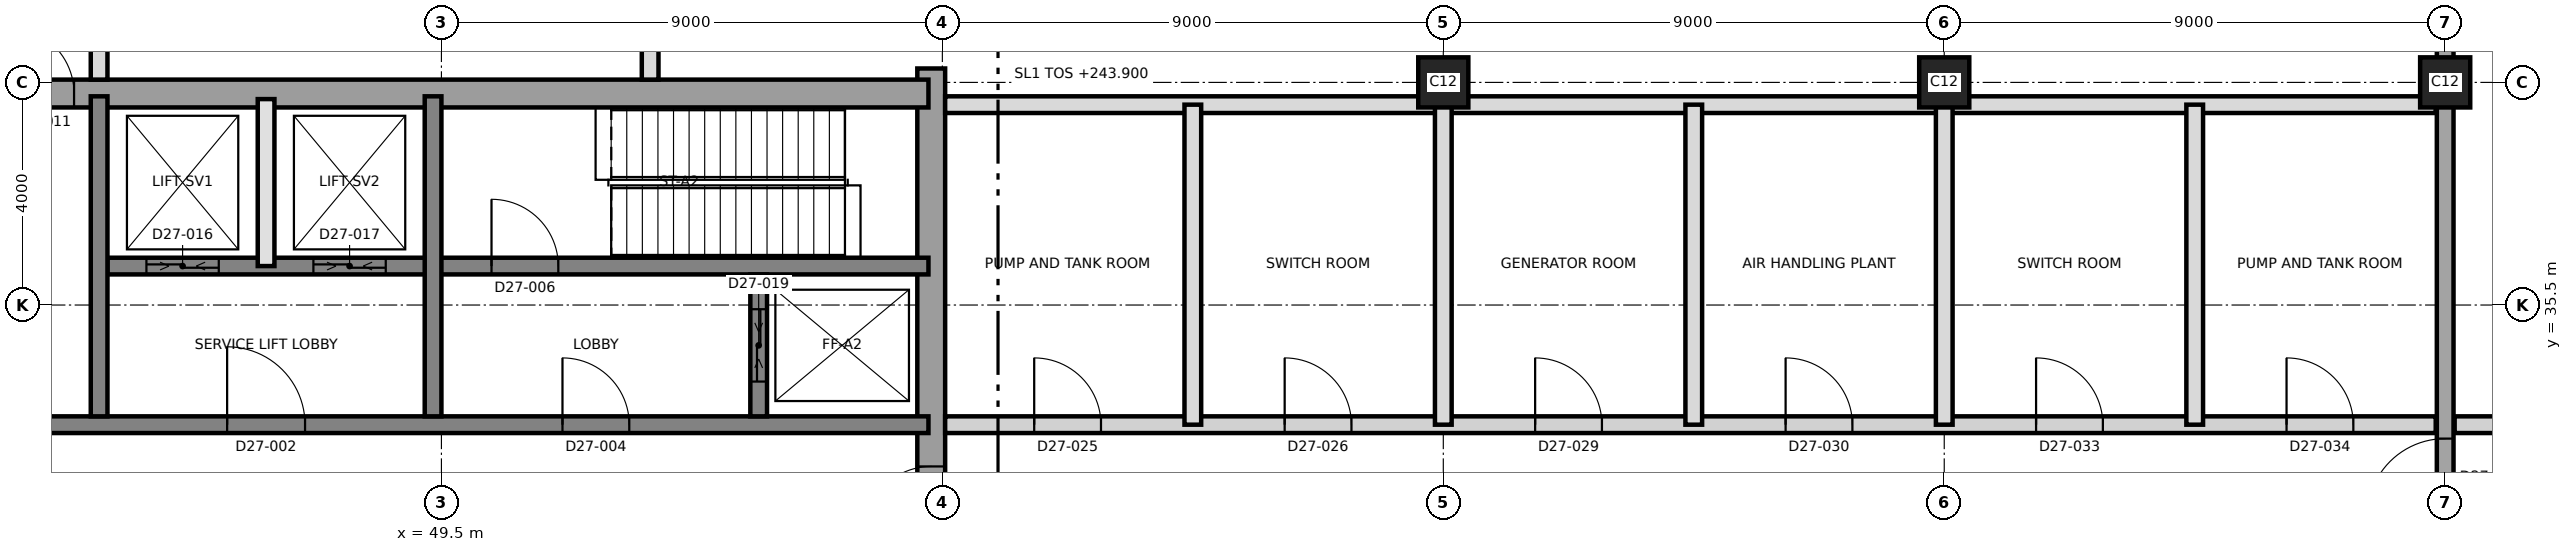
"""IFC4 building model, lengths in metres.
Left out: names, types, materials, properties, quantities, classifications, styles, units other than length and angle.
Written with IfcOpenShell. Run it as: python <this file> out.ifc"""

import sys

from ifc_helpers import new_model, si_unit, direction, frame, frame_2d, origin, origin_2d, place, context, subcontext, project, spatial, rectangle, extrude, element, fill, save


model = new_model("IFC4")
c1 = context("Model", 3, precision=1e-05, world=origin(), true_north=direction((0.0, 1.0)))
c2 = subcontext(c1, "Body", "Model", "MODEL_VIEW")
j1 = project(units=[si_unit("LENGTHUNIT", "METRE"), si_unit("PLANEANGLEUNIT", "RADIAN")], contexts=[c1])
p1 = place(None, origin())
s1 = spatial("IfcSite", under=j1, at=p1, CompositionType="ELEMENT")
p2 = place(p1, origin())
s2 = spatial("IfcBuilding", under=s1, at=p2, CompositionType="ELEMENT")
p3 = place(p2, frame((0.0, 0.0, 243.9)))
s3 = spatial("IfcBuildingStorey", under=s2, at=p3, CompositionType="ELEMENT", Elevation=243.9)
p4 = place(p3, frame((58.3, 21.25, 0.0), z_axis=(0.0, 0.0, 1.0), x_axis=(0.0, 1.0, 0.0)))
e1 = element("IfcWall", 1, at=p4, inside=s3, PredefinedType="SHEAR", context=c2, shape_type="SweptSolid", body=[
    extrude(rectangle(XDim=18.5, YDim=0.5, at=frame_2d((9.25, 0.0))), origin(), (0.0, 0.0, 1.0), 5.5),
])
p5 = place(p4, frame((10.15, 0.0, 0.0)))
e2 = element("IfcOpeningElement", 2, at=p5, cuts=e1, PredefinedType="OPENING", context=c2, shape_type="SweptSolid", body=[
    extrude(rectangle(XDim=1.2, YDim=2.1, at=frame_2d((0.6, 1.05))), frame((0.0, 0.26, 0.0), z_axis=(0.0, -1.0, 0.0), x_axis=(1.0, 0.0, 0.0)), (0.0, 0.0, 1.0), 0.52),
])
p6 = place(p3, frame((31.25, 39.3, 0.0), z_axis=(0.0, 0.0, 1.0), x_axis=(1.0, 0.0, 0.0)))
e3 = element("IfcWall", 3, at=p6, inside=s3, PredefinedType="SHEAR", context=c2, shape_type="SweptSolid", body=[
    extrude(rectangle(XDim=27.0, YDim=0.5, at=frame_2d((13.5, 0.0))), origin(), (0.0, 0.0, 1.0), 5.5),
])
p7 = place(p6, frame((10.45, 0.0, 0.0)))
e4 = element("IfcOpeningElement", 4, at=p7, cuts=e3, PredefinedType="OPENING", context=c2, shape_type="SweptSolid", body=[
    extrude(rectangle(XDim=1.2, YDim=2.1, at=frame_2d((0.6, 1.05))), frame((0.0, 0.26, 0.0), z_axis=(0.0, -1.0, 0.0), x_axis=(1.0, 0.0, 0.0)), (0.0, 0.0, 1.0), 0.52),
])
p8 = place(p3, frame((31.75, 33.35, 0.0), z_axis=(0.0, 0.0, 1.0), x_axis=(1.0, 0.0, 0.0)))
e5 = element("IfcWall", 5, at=p8, inside=s3, PredefinedType="SHEAR", context=c2, shape_type="SweptSolid", body=[
    extrude(rectangle(XDim=26.5, YDim=0.3, at=frame_2d((13.25, 0.0))), origin(), (0.0, 0.0, 1.0), 5.5),
])
p9 = place(p8, frame((13.9, 0.0, 0.0)))
e6 = element("IfcOpeningElement", 6, at=p9, cuts=e5, PredefinedType="OPENING", context=c2, shape_type="SweptSolid", body=[
    extrude(rectangle(XDim=1.4, YDim=2.1, at=frame_2d((0.7, 1.05))), frame((0.0, 0.16, 0.0), z_axis=(0.0, -1.0, 0.0), x_axis=(1.0, 0.0, 0.0)), (0.0, 0.0, 1.0), 0.32),
])
p10 = place(p8, frame((5.375, 0.0, 0.0)))
e7 = element("IfcOpeningElement", 7, at=p10, cuts=e5, PredefinedType="OPENING", context=c2, shape_type="SweptSolid", body=[
    extrude(rectangle(XDim=1.2, YDim=2.1, at=frame_2d((0.6, 1.05))), frame((0.0, 0.16, 0.0), z_axis=(0.0, -1.0, 0.0), x_axis=(1.0, 0.0, 0.0)), (0.0, 0.0, 1.0), 0.32),
])
p11 = place(p8, frame((19.925, 0.0, 0.0)))
e8 = element("IfcOpeningElement", 8, at=p11, cuts=e5, PredefinedType="OPENING", context=c2, shape_type="SweptSolid", body=[
    extrude(rectangle(XDim=1.2, YDim=2.1, at=frame_2d((0.6, 1.05))), frame((0.0, 0.16, 0.0), z_axis=(0.0, -1.0, 0.0), x_axis=(1.0, 0.0, 0.0)), (0.0, 0.0, 1.0), 0.32),
])
p12 = place(p3, frame((43.5, 36.2, 0.0), z_axis=(0.0, 0.0, 1.0), x_axis=(1.0, 0.0, 0.0)))
e9 = element("IfcWall", 9, at=p12, inside=s3, PredefinedType="SHEAR", context=c2, shape_type="SweptSolid", body=[
    extrude(rectangle(XDim=14.75, YDim=0.3, at=frame_2d((7.375, 0.0))), origin(), (0.0, 0.0, 1.0), 5.5),
])
p13 = place(p12, frame((6.9, 0.0, 0.0)))
e10 = element("IfcOpeningElement", 10, at=p13, cuts=e9, PredefinedType="OPENING", context=c2, shape_type="SweptSolid", body=[
    extrude(rectangle(XDim=1.2, YDim=2.1, at=frame_2d((0.6, 1.05))), frame((0.0, 0.16, 0.0), z_axis=(0.0, -1.0, 0.0), x_axis=(1.0, 0.0, 0.0)), (0.0, 0.0, 1.0), 0.32),
])
p14 = place(p12, frame((0.7, 0.0, 0.0)))
e11 = element("IfcOpeningElement", 11, at=p14, cuts=e9, PredefinedType="OPENING", context=c2, shape_type="SweptSolid", body=[
    extrude(rectangle(XDim=1.3, YDim=2.4, at=frame_2d((0.65, 1.2))), frame((0.0, 0.16, 0.0), z_axis=(0.0, -1.0, 0.0), x_axis=(1.0, 0.0, 0.0)), (0.0, 0.0, 1.0), 0.32),
])
p15 = place(p12, frame((3.7, 0.0, 0.0)))
e12 = element("IfcOpeningElement", 12, at=p15, cuts=e9, PredefinedType="OPENING", context=c2, shape_type="SweptSolid", body=[
    extrude(rectangle(XDim=1.3, YDim=2.4, at=frame_2d((0.65, 1.2))), frame((0.0, 0.16, 0.0), z_axis=(0.0, -1.0, 0.0), x_axis=(1.0, 0.0, 0.0)), (0.0, 0.0, 1.0), 0.32),
])
for number, where, z_axis, x_axis in (
    (13, (43.35, 33.5, 0.0), (0.0, 0.0, 1.0), (0.0, 1.0, 0.0)),
    (14, (49.35, 33.5, 0.0), (0.0, 0.0, 1.0), (0.0, 1.0, 0.0)),
):
    element("IfcWall", number, at=place(p3, frame(where, z_axis=z_axis, x_axis=x_axis)), inside=s3, PredefinedType="SHEAR", context=c2, shape_type="SweptSolid", body=[
        extrude(rectangle(XDim=5.75, YDim=0.3, at=frame_2d((2.875, 0.0))), origin(), (0.0, 0.0, 1.0), 5.5),
    ])
p16 = place(p3, frame((55.2, 33.5, 0.0), z_axis=(0.0, 0.0, 1.0), x_axis=(0.0, 1.0, 0.0)))
e15 = element("IfcWall", 15, at=p16, inside=s3, PredefinedType="SHEAR", context=c2, shape_type="SweptSolid", body=[
    extrude(rectangle(XDim=2.55, YDim=0.3, at=frame_2d((1.275, 0.0))), origin(), (0.0, 0.0, 1.0), 5.5),
])
p17 = place(p16, frame((0.625, 0.0, 0.0)))
e16 = element("IfcOpeningElement", 16, at=p17, cuts=e15, PredefinedType="OPENING", context=c2, shape_type="SweptSolid", body=[
    extrude(rectangle(XDim=1.3, YDim=2.4, at=frame_2d((0.65, 1.2))), frame((0.0, 0.16, 0.0), z_axis=(0.0, -1.0, 0.0), x_axis=(1.0, 0.0, 0.0)), (0.0, 0.0, 1.0), 0.32),
])
for number, where, z_axis, x_axis in (
    (17, (67.5, 39.5, 0.0), (0.0, 0.0, 1.0), (1.0, 0.0, 0.0)),
    (18, (76.5, 39.5, 0.0), (0.0, 0.0, 1.0), (1.0, 0.0, 0.0)),
    (19, (85.5, 39.5, 0.0), (0.0, 0.0, 1.0), (1.0, 0.0, 0.0)),
):
    element("IfcColumn", number, at=place(p3, frame(where, z_axis=z_axis, x_axis=x_axis)), inside=s3, PredefinedType="COLUMN", context=c2, shape_type="SweptSolid", body=[
        extrude(rectangle(XDim=0.9, YDim=0.9, at=origin_2d()), origin(), (0.0, 0.0, 1.0), 5.5),
    ])
p18 = place(p3, frame((85.5, 20.35, 0.0), z_axis=(0.0, 0.0, 1.0), x_axis=(0.0, 1.0, 0.0)))
e20 = element("IfcWall", 20, at=p18, inside=s3, PredefinedType="SHEAR", context=c2, shape_type="SweptSolid", body=[
    extrude(rectangle(XDim=20.3, YDim=0.3, at=frame_2d((10.15, 0.0))), origin(), (0.0, 0.0, 1.0), 5.5),
])
p19 = place(p18, frame((11.35, 0.0, 0.0)))
e21 = element("IfcOpeningElement", 21, at=p19, cuts=e20, PredefinedType="OPENING", context=c2, shape_type="SweptSolid", body=[
    extrude(rectangle(XDim=1.4, YDim=2.1, at=frame_2d((0.7, 1.05))), frame((0.0, 0.16, 0.0), z_axis=(0.0, -1.0, 0.0), x_axis=(1.0, 0.0, 0.0)), (0.0, 0.0, 1.0), 0.32),
])
p20 = place(p3, frame((46.35, 36.2, 0.0), z_axis=(0.0, 0.0, 1.0), x_axis=(0.0, 1.0, 0.0)))
e22 = element("IfcWall", 22, at=p20, inside=s3, PredefinedType="SOLIDWALL", context=c2, shape_type="SweptSolid", body=[
    extrude(rectangle(XDim=3.0, YDim=0.3, at=frame_2d((1.5, 0.0))), origin(), (0.0, 0.0, 1.0), 5.2),
])
p21 = place(p3, frame((58.55, 33.35, 0.0), z_axis=(0.0, 0.0, 1.0), x_axis=(1.0, 0.0, 0.0)))
e23 = element("IfcWall", 23, at=p21, inside=s3, PredefinedType="PARTITIONING", context=c2, shape_type="SweptSolid", body=[
    extrude(rectangle(XDim=26.78, YDim=0.3, at=frame_2d((13.39, 0.0))), origin(), (0.0, 0.0, 1.0), 5.2),
])
p22 = place(p21, frame((1.6, 0.0, 0.0)))
e24 = element("IfcOpeningElement", 24, at=p22, cuts=e23, PredefinedType="OPENING", context=c2, shape_type="SweptSolid", body=[
    extrude(rectangle(XDim=1.2, YDim=2.1, at=frame_2d((0.6, 1.05))), frame((0.0, 0.16, 0.0), z_axis=(0.0, -1.0, 0.0), x_axis=(1.0, 0.0, 0.0)), (0.0, 0.0, 1.0), 0.32),
])
p23 = place(p21, frame((6.1, 0.0, 0.0)))
e25 = element("IfcOpeningElement", 25, at=p23, cuts=e23, PredefinedType="OPENING", context=c2, shape_type="SweptSolid", body=[
    extrude(rectangle(XDim=1.2, YDim=2.1, at=frame_2d((0.6, 1.05))), frame((0.0, 0.16, 0.0), z_axis=(0.0, -1.0, 0.0), x_axis=(1.0, 0.0, 0.0)), (0.0, 0.0, 1.0), 0.32),
])
p24 = place(p21, frame((10.6, 0.0, 0.0)))
e26 = element("IfcOpeningElement", 26, at=p24, cuts=e23, PredefinedType="OPENING", context=c2, shape_type="SweptSolid", body=[
    extrude(rectangle(XDim=1.2, YDim=2.1, at=frame_2d((0.6, 1.05))), frame((0.0, 0.16, 0.0), z_axis=(0.0, -1.0, 0.0), x_axis=(1.0, 0.0, 0.0)), (0.0, 0.0, 1.0), 0.32),
])
p25 = place(p21, frame((15.1, 0.0, 0.0)))
e27 = element("IfcOpeningElement", 27, at=p25, cuts=e23, PredefinedType="OPENING", context=c2, shape_type="SweptSolid", body=[
    extrude(rectangle(XDim=1.2, YDim=2.1, at=frame_2d((0.6, 1.05))), frame((0.0, 0.16, 0.0), z_axis=(0.0, -1.0, 0.0), x_axis=(1.0, 0.0, 0.0)), (0.0, 0.0, 1.0), 0.32),
])
p26 = place(p21, frame((19.6, 0.0, 0.0)))
e28 = element("IfcOpeningElement", 28, at=p26, cuts=e23, PredefinedType="OPENING", context=c2, shape_type="SweptSolid", body=[
    extrude(rectangle(XDim=1.2, YDim=2.1, at=frame_2d((0.6, 1.05))), frame((0.0, 0.16, 0.0), z_axis=(0.0, -1.0, 0.0), x_axis=(1.0, 0.0, 0.0)), (0.0, 0.0, 1.0), 0.32),
])
p27 = place(p21, frame((24.1, 0.0, 0.0)))
e29 = element("IfcOpeningElement", 29, at=p27, cuts=e23, PredefinedType="OPENING", context=c2, shape_type="SweptSolid", body=[
    extrude(rectangle(XDim=1.2, YDim=2.1, at=frame_2d((0.6, 1.05))), frame((0.0, 0.16, 0.0), z_axis=(0.0, -1.0, 0.0), x_axis=(1.0, 0.0, 0.0)), (0.0, 0.0, 1.0), 0.32),
])
p28 = place(p3, frame((85.67, 33.35, 0.0), z_axis=(0.0, 0.0, 1.0), x_axis=(1.0, 0.0, 0.0)))
e30 = element("IfcWall", 30, at=p28, inside=s3, PredefinedType="PARTITIONING", context=c2, shape_type="SweptSolid", body=[
    extrude(rectangle(XDim=9.705, YDim=0.3, at=frame_2d((4.853, 0.0))), origin(), (0.0, 0.0, 1.0), 5.2),
])
p29 = place(p28, frame((2.73, 0.0, 0.0)))
e31 = element("IfcOpeningElement", 31, at=p29, cuts=e30, PredefinedType="OPENING", context=c2, shape_type="SweptSolid", body=[
    extrude(rectangle(XDim=1.2, YDim=2.1, at=frame_2d((0.6, 1.05))), frame((0.0, 0.16, 0.0), z_axis=(0.0, -1.0, 0.0), x_axis=(1.0, 0.0, 0.0)), (0.0, 0.0, 1.0), 0.32),
])
p30 = place(p3, frame((58.55, 39.1, 0.0), z_axis=(0.0, 0.0, 1.0), x_axis=(1.0, 0.0, 0.0)))
e32 = element("IfcWall", 32, at=p30, inside=s3, PredefinedType="PARTITIONING", context=c2, shape_type="SweptSolid", body=[
    extrude(rectangle(XDim=26.78, YDim=0.3, at=frame_2d((13.39, 0.0))), origin(), (0.0, 0.0, 1.0), 5.2),
])
p31 = place(p3, frame((43.35, 39.55, 0.0), z_axis=(0.0, 0.0, 1.0), x_axis=(0.0, 1.0, 0.0)))
e33 = element("IfcWall", 33, at=p31, inside=s3, PredefinedType="PARTITIONING", context=c2, shape_type="SweptSolid", body=[
    extrude(rectangle(XDim=18.611, YDim=0.3, at=frame_2d((9.305, 0.0))), origin(), (0.0, 0.0, 1.0), 5.2),
])
p32 = place(p31, frame((1.6, 0.0, 0.0)))
e34 = element("IfcOpeningElement", 34, at=p32, cuts=e33, PredefinedType="OPENING", context=c2, shape_type="SweptSolid", body=[
    extrude(rectangle(XDim=1.2, YDim=2.1, at=frame_2d((0.6, 1.05))), frame((0.0, 0.16, 0.0), z_axis=(0.0, -1.0, 0.0), x_axis=(1.0, 0.0, 0.0)), (0.0, 0.0, 1.0), 0.32),
])
p33 = place(p31, frame((6.1, 0.0, 0.0)))
e35 = element("IfcOpeningElement", 35, at=p33, cuts=e33, PredefinedType="OPENING", context=c2, shape_type="SweptSolid", body=[
    extrude(rectangle(XDim=1.2, YDim=2.1, at=frame_2d((0.6, 1.05))), frame((0.0, 0.16, 0.0), z_axis=(0.0, -1.0, 0.0), x_axis=(1.0, 0.0, 0.0)), (0.0, 0.0, 1.0), 0.32),
])
p34 = place(p31, frame((10.6, 0.0, 0.0)))
e36 = element("IfcOpeningElement", 36, at=p34, cuts=e33, PredefinedType="OPENING", context=c2, shape_type="SweptSolid", body=[
    extrude(rectangle(XDim=1.2, YDim=2.1, at=frame_2d((0.6, 1.05))), frame((0.0, 0.16, 0.0), z_axis=(0.0, -1.0, 0.0), x_axis=(1.0, 0.0, 0.0)), (0.0, 0.0, 1.0), 0.32),
])
p35 = place(p31, frame((15.1, 0.0, 0.0)))
e37 = element("IfcOpeningElement", 37, at=p35, cuts=e33, PredefinedType="OPENING", context=c2, shape_type="SweptSolid", body=[
    extrude(rectangle(XDim=1.2, YDim=2.1, at=frame_2d((0.6, 1.05))), frame((0.0, 0.16, 0.0), z_axis=(0.0, -1.0, 0.0), x_axis=(1.0, 0.0, 0.0)), (0.0, 0.0, 1.0), 0.32),
])
p36 = place(p3, frame((53.25, 39.55, 0.0), z_axis=(0.0, 0.0, 1.0), x_axis=(0.0, 1.0, 0.0)))
e38 = element("IfcWall", 38, at=p36, inside=s3, PredefinedType="PARTITIONING", context=c2, shape_type="SweptSolid", body=[
    extrude(rectangle(XDim=1.724, YDim=0.3, at=frame_2d((0.862, 0.0))), origin(), (0.0, 0.0, 1.0), 5.2),
])
for number, where, z_axis, x_axis in (
    (39, (63.0, 33.35, 0.0), (0.0, 0.0, 1.0), (0.0, 1.0, 0.0)),
    (40, (67.5, 33.35, 0.0), (0.0, 0.0, 1.0), (0.0, 1.0, 0.0)),
    (41, (72.0, 33.35, 0.0), (0.0, 0.0, 1.0), (0.0, 1.0, 0.0)),
    (42, (76.5, 33.35, 0.0), (0.0, 0.0, 1.0), (0.0, 1.0, 0.0)),
    (43, (81.0, 33.35, 0.0), (0.0, 0.0, 1.0), (0.0, 1.0, 0.0)),
):
    element("IfcWall", number, at=place(p3, frame(where, z_axis=z_axis, x_axis=x_axis)), inside=s3, PredefinedType="PARTITIONING", context=c2, shape_type="SweptSolid", body=[
        extrude(rectangle(XDim=5.75, YDim=0.3, at=frame_2d((2.875, 0.0))), origin(), (0.0, 0.0, 1.0), 5.2),
    ])
p37 = place(p9, origin())
e44 = element("IfcDoor", 44, at=p37, inside=s3, OperationType="SINGLE_SWING_RIGHT", PredefinedType="DOOR", context=c2, shape_type="SweptSolid", body=[
    extrude(rectangle(XDim=1.4, YDim=2.1, at=frame_2d((0.7, 1.05))), frame((0.0, 0.025, 0.0), z_axis=(0.0, -1.0, 0.0), x_axis=(1.0, 0.0, 0.0)), (0.0, 0.0, 1.0), 0.05),
])
fill(e6, e44)
p38 = place(p11, origin())
e45 = element("IfcDoor", 45, at=p38, inside=s3, OperationType="SINGLE_SWING_RIGHT", PredefinedType="DOOR", context=c2, shape_type="SweptSolid", body=[
    extrude(rectangle(XDim=1.2, YDim=2.1, at=frame_2d((0.6, 1.05))), frame((0.0, 0.025, 0.0), z_axis=(0.0, -1.0, 0.0), x_axis=(1.0, 0.0, 0.0)), (0.0, 0.0, 1.0), 0.05),
])
fill(e8, e45)
p39 = place(p13, origin())
e46 = element("IfcDoor", 46, at=p39, inside=s3, OperationType="SINGLE_SWING_LEFT", PredefinedType="DOOR", context=c2, shape_type="SweptSolid", body=[
    extrude(rectangle(XDim=1.2, YDim=2.1, at=frame_2d((0.6, 1.05))), frame((0.0, 0.025, 0.0), z_axis=(0.0, -1.0, 0.0), x_axis=(1.0, 0.0, 0.0)), (0.0, 0.0, 1.0), 0.05),
])
fill(e10, e46)
p40 = place(p5, origin())
e47 = element("IfcDoor", 47, at=p40, inside=s3, OperationType="SINGLE_SWING_LEFT", PredefinedType="DOOR", context=c2, shape_type="SweptSolid", body=[
    extrude(rectangle(XDim=1.2, YDim=2.1, at=frame_2d((0.6, 1.05))), frame((0.0, 0.025, 0.0), z_axis=(0.0, -1.0, 0.0), x_axis=(1.0, 0.0, 0.0)), (0.0, 0.0, 1.0), 0.05),
])
fill(e2, e47)
p41 = place(p7, origin())
e48 = element("IfcDoor", 48, at=p41, inside=s3, OperationType="SINGLE_SWING_RIGHT", PredefinedType="DOOR", context=c2, shape_type="SweptSolid", body=[
    extrude(rectangle(XDim=1.2, YDim=2.1, at=frame_2d((0.6, 1.05))), frame((0.0, 0.025, 0.0), z_axis=(0.0, -1.0, 0.0), x_axis=(1.0, 0.0, 0.0)), (0.0, 0.0, 1.0), 0.05),
])
fill(e4, e48)
p42 = place(p14, origin())
e49 = element("IfcDoor", 49, at=p42, inside=s3, OperationType="SLIDING_TO_LEFT", PredefinedType="DOOR", context=c2, shape_type="SweptSolid", body=[
    extrude(rectangle(XDim=1.3, YDim=2.4, at=frame_2d((0.65, 1.2))), frame((0.0, 0.025, 0.0), z_axis=(0.0, -1.0, 0.0), x_axis=(1.0, 0.0, 0.0)), (0.0, 0.0, 1.0), 0.05),
])
fill(e11, e49)
p43 = place(p15, origin())
e50 = element("IfcDoor", 50, at=p43, inside=s3, OperationType="SLIDING_TO_LEFT", PredefinedType="DOOR", context=c2, shape_type="SweptSolid", body=[
    extrude(rectangle(XDim=1.3, YDim=2.4, at=frame_2d((0.65, 1.2))), frame((0.0, 0.025, 0.0), z_axis=(0.0, -1.0, 0.0), x_axis=(1.0, 0.0, 0.0)), (0.0, 0.0, 1.0), 0.05),
])
fill(e12, e50)
p44 = place(p17, origin())
e51 = element("IfcDoor", 51, at=p44, inside=s3, OperationType="SLIDING_TO_LEFT", PredefinedType="DOOR", context=c2, shape_type="SweptSolid", body=[
    extrude(rectangle(XDim=1.3, YDim=2.4, at=frame_2d((0.65, 1.2))), frame((0.0, 0.025, 0.0), z_axis=(0.0, -1.0, 0.0), x_axis=(1.0, 0.0, 0.0)), (0.0, 0.0, 1.0), 0.05),
])
fill(e16, e51)
p45 = place(p22, origin())
e52 = element("IfcDoor", 52, at=p45, inside=s3, OperationType="SINGLE_SWING_LEFT", PredefinedType="DOOR", context=c2, shape_type="SweptSolid", body=[
    extrude(rectangle(XDim=1.2, YDim=2.1, at=frame_2d((0.6, 1.05))), frame((0.0, 0.025, 0.0), z_axis=(0.0, -1.0, 0.0), x_axis=(1.0, 0.0, 0.0)), (0.0, 0.0, 1.0), 0.05),
])
fill(e24, e52)
p46 = place(p23, origin())
e53 = element("IfcDoor", 53, at=p46, inside=s3, OperationType="SINGLE_SWING_LEFT", PredefinedType="DOOR", context=c2, shape_type="SweptSolid", body=[
    extrude(rectangle(XDim=1.2, YDim=2.1, at=frame_2d((0.6, 1.05))), frame((0.0, 0.025, 0.0), z_axis=(0.0, -1.0, 0.0), x_axis=(1.0, 0.0, 0.0)), (0.0, 0.0, 1.0), 0.05),
])
fill(e25, e53)
p47 = place(p24, origin())
e54 = element("IfcDoor", 54, at=p47, inside=s3, OperationType="SINGLE_SWING_LEFT", PredefinedType="DOOR", context=c2, shape_type="SweptSolid", body=[
    extrude(rectangle(XDim=1.2, YDim=2.1, at=frame_2d((0.6, 1.05))), frame((0.0, 0.025, 0.0), z_axis=(0.0, -1.0, 0.0), x_axis=(1.0, 0.0, 0.0)), (0.0, 0.0, 1.0), 0.05),
])
fill(e26, e54)
p48 = place(p25, origin())
e55 = element("IfcDoor", 55, at=p48, inside=s3, OperationType="SINGLE_SWING_RIGHT", PredefinedType="DOOR", context=c2, shape_type="SweptSolid", body=[
    extrude(rectangle(XDim=1.2, YDim=2.1, at=frame_2d((0.6, 1.05))), frame((0.0, 0.025, 0.0), z_axis=(0.0, -1.0, 0.0), x_axis=(1.0, 0.0, 0.0)), (0.0, 0.0, 1.0), 0.05),
])
fill(e27, e55)
p49 = place(p26, origin())
e56 = element("IfcDoor", 56, at=p49, inside=s3, OperationType="SINGLE_SWING_RIGHT", PredefinedType="DOOR", context=c2, shape_type="SweptSolid", body=[
    extrude(rectangle(XDim=1.2, YDim=2.1, at=frame_2d((0.6, 1.05))), frame((0.0, 0.025, 0.0), z_axis=(0.0, -1.0, 0.0), x_axis=(1.0, 0.0, 0.0)), (0.0, 0.0, 1.0), 0.05),
])
fill(e28, e56)
p50 = place(p27, origin())
e57 = element("IfcDoor", 57, at=p50, inside=s3, OperationType="SINGLE_SWING_LEFT", PredefinedType="DOOR", context=c2, shape_type="SweptSolid", body=[
    extrude(rectangle(XDim=1.2, YDim=2.1, at=frame_2d((0.6, 1.05))), frame((0.0, 0.025, 0.0), z_axis=(0.0, -1.0, 0.0), x_axis=(1.0, 0.0, 0.0)), (0.0, 0.0, 1.0), 0.05),
])
fill(e29, e57)
p51 = place(p19, origin())
e58 = element("IfcDoor", 58, at=p51, inside=s3, OperationType="SINGLE_SWING_RIGHT", PredefinedType="DOOR", context=c2, shape_type="SweptSolid", body=[
    extrude(rectangle(XDim=1.4, YDim=2.1, at=frame_2d((0.7, 1.05))), frame((0.0, 0.025, 0.0), z_axis=(0.0, -1.0, 0.0), x_axis=(1.0, 0.0, 0.0)), (0.0, 0.0, 1.0), 0.05),
])
fill(e21, e58)
save(model, sys.argv[1])
